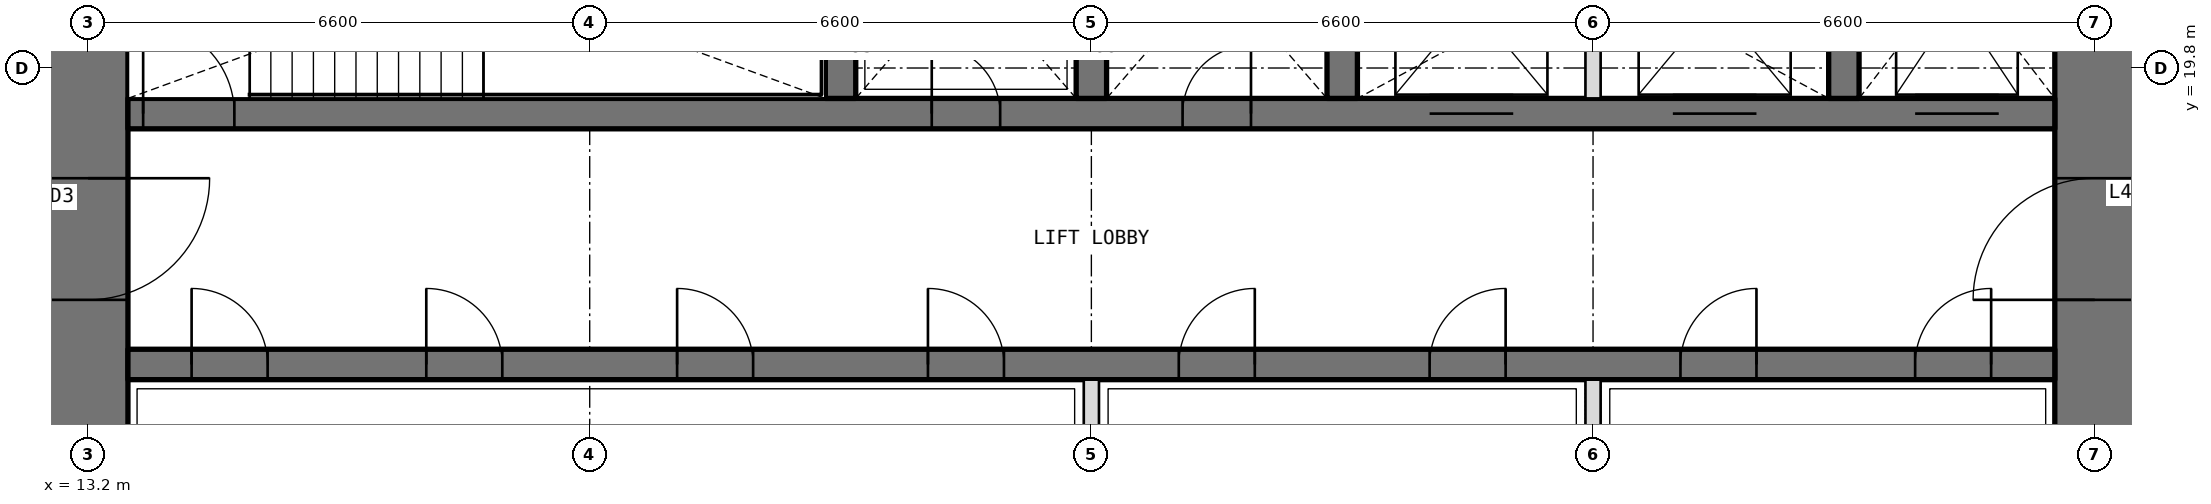
"""IFC4 building model, lengths in metres.
Left out: names, types, materials, properties, quantities, classifications, styles, units other than length and angle.
Written with IfcOpenShell. Run it as: python <this file> out.ifc"""

import sys

from ifc_helpers import new_model, si_unit, direction, frame, frame_2d, origin, place, context, subcontext, project, spatial, rectangle, extrude, element, fill, save


model = new_model("IFC4")
c1 = context("Model", 3, precision=1e-05, world=origin(), true_north=direction((0.0, 1.0)))
c2 = subcontext(c1, "Body", "Model", "MODEL_VIEW")
j1 = project(units=[si_unit("LENGTHUNIT", "METRE"), si_unit("PLANEANGLEUNIT", "RADIAN")], contexts=[c1])
p1 = place(None, origin())
s1 = spatial("IfcSite", under=j1, at=p1, CompositionType="ELEMENT")
p2 = place(p1, origin())
s2 = spatial("IfcBuilding", under=s1, at=p2, CompositionType="ELEMENT")
p3 = place(p2, frame((0.0, 0.0, 176.7)))
s3 = spatial("IfcBuildingStorey", under=s2, at=p3, CompositionType="ELEMENT", Elevation=176.7)
p4 = place(p3, frame((39.6, 13.725, 0.0), z_axis=(0.0, 0.0, 1.0), x_axis=(0.0, 1.0, 0.0)))
e1 = element("IfcWall", 1, at=p4, inside=s3, PredefinedType="SHEAR", context=c2, shape_type="SweptSolid", body=[
    extrude(rectangle(XDim=18.75, YDim=1.05, at=frame_2d((9.375, 0.0))), origin(), (0.0, 0.0, 1.0), 4.2),
])
p5 = place(p4, frame((3.025, 0.0, 0.0)))
e2 = element("IfcOpeningElement", 2, at=p5, cuts=e1, PredefinedType="OPENING", context=c2, shape_type="SweptSolid", body=[
    extrude(rectangle(XDim=1.6, YDim=2.1, at=frame_2d((0.8, 1.05))), frame((0.0, 0.535, 0.0), z_axis=(0.0, -1.0, 0.0), x_axis=(1.0, 0.0, 0.0)), (0.0, 0.0, 1.0), 1.07),
])
p6 = place(p4, frame((13.825, 0.0, 0.0)))
e3 = element("IfcOpeningElement", 3, at=p6, cuts=e1, PredefinedType="OPENING", context=c2, shape_type="SweptSolid", body=[
    extrude(rectangle(XDim=1.6, YDim=2.1, at=frame_2d((0.8, 1.05))), frame((0.0, 0.535, 0.0), z_axis=(0.0, -1.0, 0.0), x_axis=(1.0, 0.0, 0.0)), (0.0, 0.0, 1.0), 1.07),
])
p7 = place(p3, frame((13.2, 32.475, 0.0), z_axis=(0.0, 0.0, 1.0), x_axis=(0.0, -1.0, 0.0)))
e4 = element("IfcWall", 4, at=p7, inside=s3, PredefinedType="SHEAR", context=c2, shape_type="SweptSolid", body=[
    extrude(rectangle(XDim=18.75, YDim=1.05, at=frame_2d((9.375, 0.0))), origin(), (0.0, 0.0, 1.0), 4.2),
])
p8 = place(p7, frame((14.125, 0.0, 0.0)))
e5 = element("IfcOpeningElement", 5, at=p8, cuts=e4, PredefinedType="OPENING", context=c2, shape_type="SweptSolid", body=[
    extrude(rectangle(XDim=1.6, YDim=2.1, at=frame_2d((0.8, 1.05))), frame((0.0, 0.535, 0.0), z_axis=(0.0, -1.0, 0.0), x_axis=(1.0, 0.0, 0.0)), (0.0, 0.0, 1.0), 1.07),
])
p9 = place(p7, frame((3.325, 0.0, 0.0)))
e6 = element("IfcOpeningElement", 6, at=p9, cuts=e4, PredefinedType="OPENING", context=c2, shape_type="SweptSolid", body=[
    extrude(rectangle(XDim=1.6, YDim=2.1, at=frame_2d((0.8, 1.05))), frame((0.0, 0.535, 0.0), z_axis=(0.0, -1.0, 0.0), x_axis=(1.0, 0.0, 0.0)), (0.0, 0.0, 1.0), 1.07),
])
p10 = place(p3, frame((13.725, 15.9, 0.0), z_axis=(0.0, 0.0, 1.0), x_axis=(1.0, 0.0, 0.0)))
e7 = element("IfcWall", 7, at=p10, inside=s3, PredefinedType="SHEAR", context=c2, shape_type="SweptSolid", body=[
    extrude(rectangle(XDim=25.35, YDim=0.4, at=frame_2d((12.675, 0.0))), origin(), (0.0, 0.0, 1.0), 4.2),
])
p11 = place(p10, frame((0.837, 0.0, 0.0)))
e8 = element("IfcOpeningElement", 8, at=p11, cuts=e7, PredefinedType="OPENING", context=c2, shape_type="SweptSolid", body=[
    extrude(rectangle(XDim=1.0, YDim=2.1, at=frame_2d((0.5, 1.05))), frame((0.0, 0.21, 0.0), z_axis=(0.0, -1.0, 0.0), x_axis=(1.0, 0.0, 0.0)), (0.0, 0.0, 1.0), 0.42),
])
p12 = place(p10, frame((3.925, 0.0, 0.0)))
e9 = element("IfcOpeningElement", 9, at=p12, cuts=e7, PredefinedType="OPENING", context=c2, shape_type="SweptSolid", body=[
    extrude(rectangle(XDim=1.0, YDim=2.1, at=frame_2d((0.5, 1.05))), frame((0.0, 0.21, 0.0), z_axis=(0.0, -1.0, 0.0), x_axis=(1.0, 0.0, 0.0)), (0.0, 0.0, 1.0), 0.42),
])
p13 = place(p10, frame((7.225, 0.0, 0.0)))
e10 = element("IfcOpeningElement", 10, at=p13, cuts=e7, PredefinedType="OPENING", context=c2, shape_type="SweptSolid", body=[
    extrude(rectangle(XDim=1.0, YDim=2.1, at=frame_2d((0.5, 1.05))), frame((0.0, 0.21, 0.0), z_axis=(0.0, -1.0, 0.0), x_axis=(1.0, 0.0, 0.0)), (0.0, 0.0, 1.0), 0.42),
])
p14 = place(p10, frame((10.525, 0.0, 0.0)))
e11 = element("IfcOpeningElement", 11, at=p14, cuts=e7, PredefinedType="OPENING", context=c2, shape_type="SweptSolid", body=[
    extrude(rectangle(XDim=1.0, YDim=2.1, at=frame_2d((0.5, 1.05))), frame((0.0, 0.21, 0.0), z_axis=(0.0, -1.0, 0.0), x_axis=(1.0, 0.0, 0.0)), (0.0, 0.0, 1.0), 0.42),
])
p15 = place(p10, frame((13.825, 0.0, 0.0)))
e12 = element("IfcOpeningElement", 12, at=p15, cuts=e7, PredefinedType="OPENING", context=c2, shape_type="SweptSolid", body=[
    extrude(rectangle(XDim=1.0, YDim=2.1, at=frame_2d((0.5, 1.05))), frame((0.0, 0.21, 0.0), z_axis=(0.0, -1.0, 0.0), x_axis=(1.0, 0.0, 0.0)), (0.0, 0.0, 1.0), 0.42),
])
p16 = place(p10, frame((17.125, 0.0, 0.0)))
e13 = element("IfcOpeningElement", 13, at=p16, cuts=e7, PredefinedType="OPENING", context=c2, shape_type="SweptSolid", body=[
    extrude(rectangle(XDim=1.0, YDim=2.1, at=frame_2d((0.5, 1.05))), frame((0.0, 0.21, 0.0), z_axis=(0.0, -1.0, 0.0), x_axis=(1.0, 0.0, 0.0)), (0.0, 0.0, 1.0), 0.42),
])
p17 = place(p10, frame((20.425, 0.0, 0.0)))
e14 = element("IfcOpeningElement", 14, at=p17, cuts=e7, PredefinedType="OPENING", context=c2, shape_type="SweptSolid", body=[
    extrude(rectangle(XDim=1.0, YDim=2.1, at=frame_2d((0.5, 1.05))), frame((0.0, 0.21, 0.0), z_axis=(0.0, -1.0, 0.0), x_axis=(1.0, 0.0, 0.0)), (0.0, 0.0, 1.0), 0.42),
])
p18 = place(p10, frame((23.512, 0.0, 0.0)))
e15 = element("IfcOpeningElement", 15, at=p18, cuts=e7, PredefinedType="OPENING", context=c2, shape_type="SweptSolid", body=[
    extrude(rectangle(XDim=1.0, YDim=2.1, at=frame_2d((0.5, 1.05))), frame((0.0, 0.21, 0.0), z_axis=(0.0, -1.0, 0.0), x_axis=(1.0, 0.0, 0.0)), (0.0, 0.0, 1.0), 0.42),
])
p19 = place(p3, frame((13.725, 19.2, 0.0), z_axis=(0.0, 0.0, 1.0), x_axis=(1.0, 0.0, 0.0)))
e16 = element("IfcWall", 16, at=p19, inside=s3, PredefinedType="SHEAR", context=c2, shape_type="SweptSolid", body=[
    extrude(rectangle(XDim=25.35, YDim=0.4, at=frame_2d((12.675, 0.0))), origin(), (0.0, 0.0, 1.0), 4.2),
])
p20 = place(p19, frame((10.575, 0.0, 0.0)))
e17 = element("IfcOpeningElement", 17, at=p20, cuts=e16, PredefinedType="OPENING", context=c2, shape_type="SweptSolid", body=[
    extrude(rectangle(XDim=0.9, YDim=2.1, at=frame_2d((0.45, 1.05))), frame((0.0, 0.21, 0.0), z_axis=(0.0, -1.0, 0.0), x_axis=(1.0, 0.0, 0.0)), (0.0, 0.0, 1.0), 0.42),
])
p21 = place(p19, frame((13.875, 0.0, 0.0)))
e18 = element("IfcOpeningElement", 18, at=p21, cuts=e16, PredefinedType="OPENING", context=c2, shape_type="SweptSolid", body=[
    extrude(rectangle(XDim=0.9, YDim=2.1, at=frame_2d((0.45, 1.05))), frame((0.0, 0.21, 0.0), z_axis=(0.0, -1.0, 0.0), x_axis=(1.0, 0.0, 0.0)), (0.0, 0.0, 1.0), 0.42),
])
p22 = place(p19, frame((0.2, 0.0, 0.0)))
e19 = element("IfcOpeningElement", 19, at=p22, cuts=e16, PredefinedType="OPENING", context=c2, shape_type="SweptSolid", body=[
    extrude(rectangle(XDim=1.2, YDim=2.1, at=frame_2d((0.6, 1.05))), frame((0.0, 0.21, 0.0), z_axis=(0.0, -1.0, 0.0), x_axis=(1.0, 0.0, 0.0)), (0.0, 0.0, 1.0), 0.42),
])
p23 = place(p19, frame((23.512, 0.0, 0.0)))
e20 = element("IfcOpeningElement", 20, at=p23, cuts=e16, PredefinedType="OPENING", context=c2, shape_type="SweptSolid", body=[
    extrude(rectangle(XDim=1.1, YDim=2.1, at=frame_2d((0.55, 1.05))), frame((0.0, 0.21, 0.0), z_axis=(0.0, -1.0, 0.0), x_axis=(1.0, 0.0, 0.0)), (0.0, 0.0, 1.0), 0.42),
])
p24 = place(p19, frame((17.125, 0.0, 0.0)))
e21 = element("IfcOpeningElement", 21, at=p24, cuts=e16, PredefinedType="OPENING", context=c2, shape_type="SweptSolid", body=[
    extrude(rectangle(XDim=1.1, YDim=2.1, at=frame_2d((0.55, 1.05))), frame((0.0, 0.21, 0.0), z_axis=(0.0, -1.0, 0.0), x_axis=(1.0, 0.0, 0.0)), (0.0, 0.0, 1.0), 0.42),
])
p25 = place(p19, frame((20.325, 0.0, 0.0)))
e22 = element("IfcOpeningElement", 22, at=p25, cuts=e16, PredefinedType="OPENING", context=c2, shape_type="SweptSolid", body=[
    extrude(rectangle(XDim=1.1, YDim=2.1, at=frame_2d((0.55, 1.05))), frame((0.0, 0.21, 0.0), z_axis=(0.0, -1.0, 0.0), x_axis=(1.0, 0.0, 0.0)), (0.0, 0.0, 1.0), 0.42),
])
for number, where, z_axis, x_axis in (
    (23, (23.1, 19.4, 0.0), (0.0, 0.0, 1.0), (0.0, 1.0, 0.0)),
    (24, (26.4, 19.4, 0.0), (0.0, 0.0, 1.0), (0.0, 1.0, 0.0)),
    (25, (29.7, 19.4, 0.0), (0.0, 0.0, 1.0), (0.0, 1.0, 0.0)),
    (26, (36.3, 19.4, 0.0), (0.0, 0.0, 1.0), (0.0, 1.0, 0.0)),
):
    element("IfcWall", number, at=place(p3, frame(where, z_axis=z_axis, x_axis=x_axis)), inside=s3, PredefinedType="SHEAR", context=c2, shape_type="SweptSolid", body=[
        extrude(rectangle(XDim=3.35, YDim=0.4, at=frame_2d((1.675, 0.0))), origin(), (0.0, 0.0, 1.0), 4.2),
    ])
for number, where, z_axis, x_axis in (
    (27, (26.4, 13.725, 0.0), (0.0, 0.0, 1.0), (0.0, 1.0, 0.0)),
    (28, (33.0, 13.725, 0.0), (0.0, 0.0, 1.0), (0.0, 1.0, 0.0)),
):
    element("IfcWall", number, at=place(p3, frame(where, z_axis=z_axis, x_axis=x_axis)), inside=s3, PredefinedType="PARTITIONING", context=c2, shape_type="SweptSolid", body=[
        extrude(rectangle(XDim=1.975, YDim=0.2, at=frame_2d((0.987, 0.0))), origin(), (0.0, 0.0, 1.0), 4.2),
    ])
p26 = place(p3, frame((33.0, 19.4, 0.0), z_axis=(0.0, 0.0, 1.0), x_axis=(0.0, 1.0, 0.0)))
e29 = element("IfcWall", 29, at=p26, inside=s3, PredefinedType="PARTITIONING", context=c2, shape_type="SweptSolid", body=[
    extrude(rectangle(XDim=3.35, YDim=0.2, at=frame_2d((1.675, 0.0))), origin(), (0.0, 0.0, 1.0), 4.2),
])
p27 = place(p20, origin())
e30 = element("IfcDoor", 30, at=p27, inside=s3, OperationType="SINGLE_SWING_LEFT", PredefinedType="DOOR", context=c2, shape_type="SweptSolid", body=[
    extrude(rectangle(XDim=0.9, YDim=2.1, at=frame_2d((0.45, 1.05))), frame((0.0, 0.025, 0.0), z_axis=(0.0, -1.0, 0.0), x_axis=(1.0, 0.0, 0.0)), (0.0, 0.0, 1.0), 0.05),
])
fill(e17, e30)
p28 = place(p21, origin())
e31 = element("IfcDoor", 31, at=p28, inside=s3, OperationType="SINGLE_SWING_RIGHT", PredefinedType="DOOR", context=c2, shape_type="SweptSolid", body=[
    extrude(rectangle(XDim=0.9, YDim=2.1, at=frame_2d((0.45, 1.05))), frame((0.0, 0.025, 0.0), z_axis=(0.0, -1.0, 0.0), x_axis=(1.0, 0.0, 0.0)), (0.0, 0.0, 1.0), 0.05),
])
fill(e18, e31)
p29 = place(p11, origin())
e32 = element("IfcDoor", 32, at=p29, inside=s3, OperationType="SINGLE_SWING_LEFT", PredefinedType="DOOR", context=c2, shape_type="SweptSolid", body=[
    extrude(rectangle(XDim=1.0, YDim=2.1, at=frame_2d((0.5, 1.05))), frame((0.0, 0.025, 0.0), z_axis=(0.0, -1.0, 0.0), x_axis=(1.0, 0.0, 0.0)), (0.0, 0.0, 1.0), 0.05),
])
fill(e8, e32)
p30 = place(p12, origin())
e33 = element("IfcDoor", 33, at=p30, inside=s3, OperationType="SINGLE_SWING_LEFT", PredefinedType="DOOR", context=c2, shape_type="SweptSolid", body=[
    extrude(rectangle(XDim=1.0, YDim=2.1, at=frame_2d((0.5, 1.05))), frame((0.0, 0.025, 0.0), z_axis=(0.0, -1.0, 0.0), x_axis=(1.0, 0.0, 0.0)), (0.0, 0.0, 1.0), 0.05),
])
fill(e9, e33)
p31 = place(p13, origin())
e34 = element("IfcDoor", 34, at=p31, inside=s3, OperationType="SINGLE_SWING_LEFT", PredefinedType="DOOR", context=c2, shape_type="SweptSolid", body=[
    extrude(rectangle(XDim=1.0, YDim=2.1, at=frame_2d((0.5, 1.05))), frame((0.0, 0.025, 0.0), z_axis=(0.0, -1.0, 0.0), x_axis=(1.0, 0.0, 0.0)), (0.0, 0.0, 1.0), 0.05),
])
fill(e10, e34)
p32 = place(p14, origin())
e35 = element("IfcDoor", 35, at=p32, inside=s3, OperationType="SINGLE_SWING_LEFT", PredefinedType="DOOR", context=c2, shape_type="SweptSolid", body=[
    extrude(rectangle(XDim=1.0, YDim=2.1, at=frame_2d((0.5, 1.05))), frame((0.0, 0.025, 0.0), z_axis=(0.0, -1.0, 0.0), x_axis=(1.0, 0.0, 0.0)), (0.0, 0.0, 1.0), 0.05),
])
fill(e11, e35)
p33 = place(p15, origin())
e36 = element("IfcDoor", 36, at=p33, inside=s3, OperationType="SINGLE_SWING_RIGHT", PredefinedType="DOOR", context=c2, shape_type="SweptSolid", body=[
    extrude(rectangle(XDim=1.0, YDim=2.1, at=frame_2d((0.5, 1.05))), frame((0.0, 0.025, 0.0), z_axis=(0.0, -1.0, 0.0), x_axis=(1.0, 0.0, 0.0)), (0.0, 0.0, 1.0), 0.05),
])
fill(e12, e36)
p34 = place(p16, origin())
e37 = element("IfcDoor", 37, at=p34, inside=s3, OperationType="SINGLE_SWING_RIGHT", PredefinedType="DOOR", context=c2, shape_type="SweptSolid", body=[
    extrude(rectangle(XDim=1.0, YDim=2.1, at=frame_2d((0.5, 1.05))), frame((0.0, 0.025, 0.0), z_axis=(0.0, -1.0, 0.0), x_axis=(1.0, 0.0, 0.0)), (0.0, 0.0, 1.0), 0.05),
])
fill(e13, e37)
p35 = place(p17, origin())
e38 = element("IfcDoor", 38, at=p35, inside=s3, OperationType="SINGLE_SWING_RIGHT", PredefinedType="DOOR", context=c2, shape_type="SweptSolid", body=[
    extrude(rectangle(XDim=1.0, YDim=2.1, at=frame_2d((0.5, 1.05))), frame((0.0, 0.025, 0.0), z_axis=(0.0, -1.0, 0.0), x_axis=(1.0, 0.0, 0.0)), (0.0, 0.0, 1.0), 0.05),
])
fill(e14, e38)
p36 = place(p18, origin())
e39 = element("IfcDoor", 39, at=p36, inside=s3, OperationType="SINGLE_SWING_RIGHT", PredefinedType="DOOR", context=c2, shape_type="SweptSolid", body=[
    extrude(rectangle(XDim=1.0, YDim=2.1, at=frame_2d((0.5, 1.05))), frame((0.0, 0.025, 0.0), z_axis=(0.0, -1.0, 0.0), x_axis=(1.0, 0.0, 0.0)), (0.0, 0.0, 1.0), 0.05),
])
fill(e15, e39)
p37 = place(p22, origin())
e40 = element("IfcDoor", 40, at=p37, inside=s3, OperationType="SINGLE_SWING_LEFT", PredefinedType="DOOR", context=c2, shape_type="SweptSolid", body=[
    extrude(rectangle(XDim=1.2, YDim=2.1, at=frame_2d((0.6, 1.05))), frame((0.0, 0.025, 0.0), z_axis=(0.0, -1.0, 0.0), x_axis=(1.0, 0.0, 0.0)), (0.0, 0.0, 1.0), 0.05),
])
fill(e19, e40)
p38 = place(p8, origin())
e41 = element("IfcDoor", 41, at=p38, inside=s3, OperationType="DOUBLE_DOOR_DOUBLE_SWING", PredefinedType="DOOR", context=c2, shape_type="SweptSolid", body=[
    extrude(rectangle(XDim=1.6, YDim=2.1, at=frame_2d((0.8, 1.05))), frame((0.0, 0.025, 0.0), z_axis=(0.0, -1.0, 0.0), x_axis=(1.0, 0.0, 0.0)), (0.0, 0.0, 1.0), 0.05),
])
fill(e5, e41)
p39 = place(p5, origin())
e42 = element("IfcDoor", 42, at=p39, inside=s3, OperationType="DOUBLE_DOOR_DOUBLE_SWING", PredefinedType="DOOR", context=c2, shape_type="SweptSolid", body=[
    extrude(rectangle(XDim=1.6, YDim=2.1, at=frame_2d((0.8, 1.05))), frame((0.0, 0.025, 0.0), z_axis=(0.0, -1.0, 0.0), x_axis=(1.0, 0.0, 0.0)), (0.0, 0.0, 1.0), 0.05),
])
fill(e2, e42)
p40 = place(p23, origin())
e43 = element("IfcDoor", 43, at=p40, inside=s3, OperationType="DOUBLE_DOOR_SLIDING", PredefinedType="DOOR", context=c2, shape_type="SweptSolid", body=[
    extrude(rectangle(XDim=1.1, YDim=2.1, at=frame_2d((0.55, 1.05))), frame((0.0, 0.025, 0.0), z_axis=(0.0, -1.0, 0.0), x_axis=(1.0, 0.0, 0.0)), (0.0, 0.0, 1.0), 0.05),
])
fill(e20, e43)
p41 = place(p24, origin())
e44 = element("IfcDoor", 44, at=p41, inside=s3, OperationType="DOUBLE_DOOR_SLIDING", PredefinedType="DOOR", context=c2, shape_type="SweptSolid", body=[
    extrude(rectangle(XDim=1.1, YDim=2.1, at=frame_2d((0.55, 1.05))), frame((0.0, 0.025, 0.0), z_axis=(0.0, -1.0, 0.0), x_axis=(1.0, 0.0, 0.0)), (0.0, 0.0, 1.0), 0.05),
])
fill(e21, e44)
p42 = place(p25, origin())
e45 = element("IfcDoor", 45, at=p42, inside=s3, OperationType="DOUBLE_DOOR_SLIDING", PredefinedType="DOOR", context=c2, shape_type="SweptSolid", body=[
    extrude(rectangle(XDim=1.1, YDim=2.1, at=frame_2d((0.55, 1.05))), frame((0.0, 0.025, 0.0), z_axis=(0.0, -1.0, 0.0), x_axis=(1.0, 0.0, 0.0)), (0.0, 0.0, 1.0), 0.05),
])
fill(e22, e45)
save(model, sys.argv[1])
